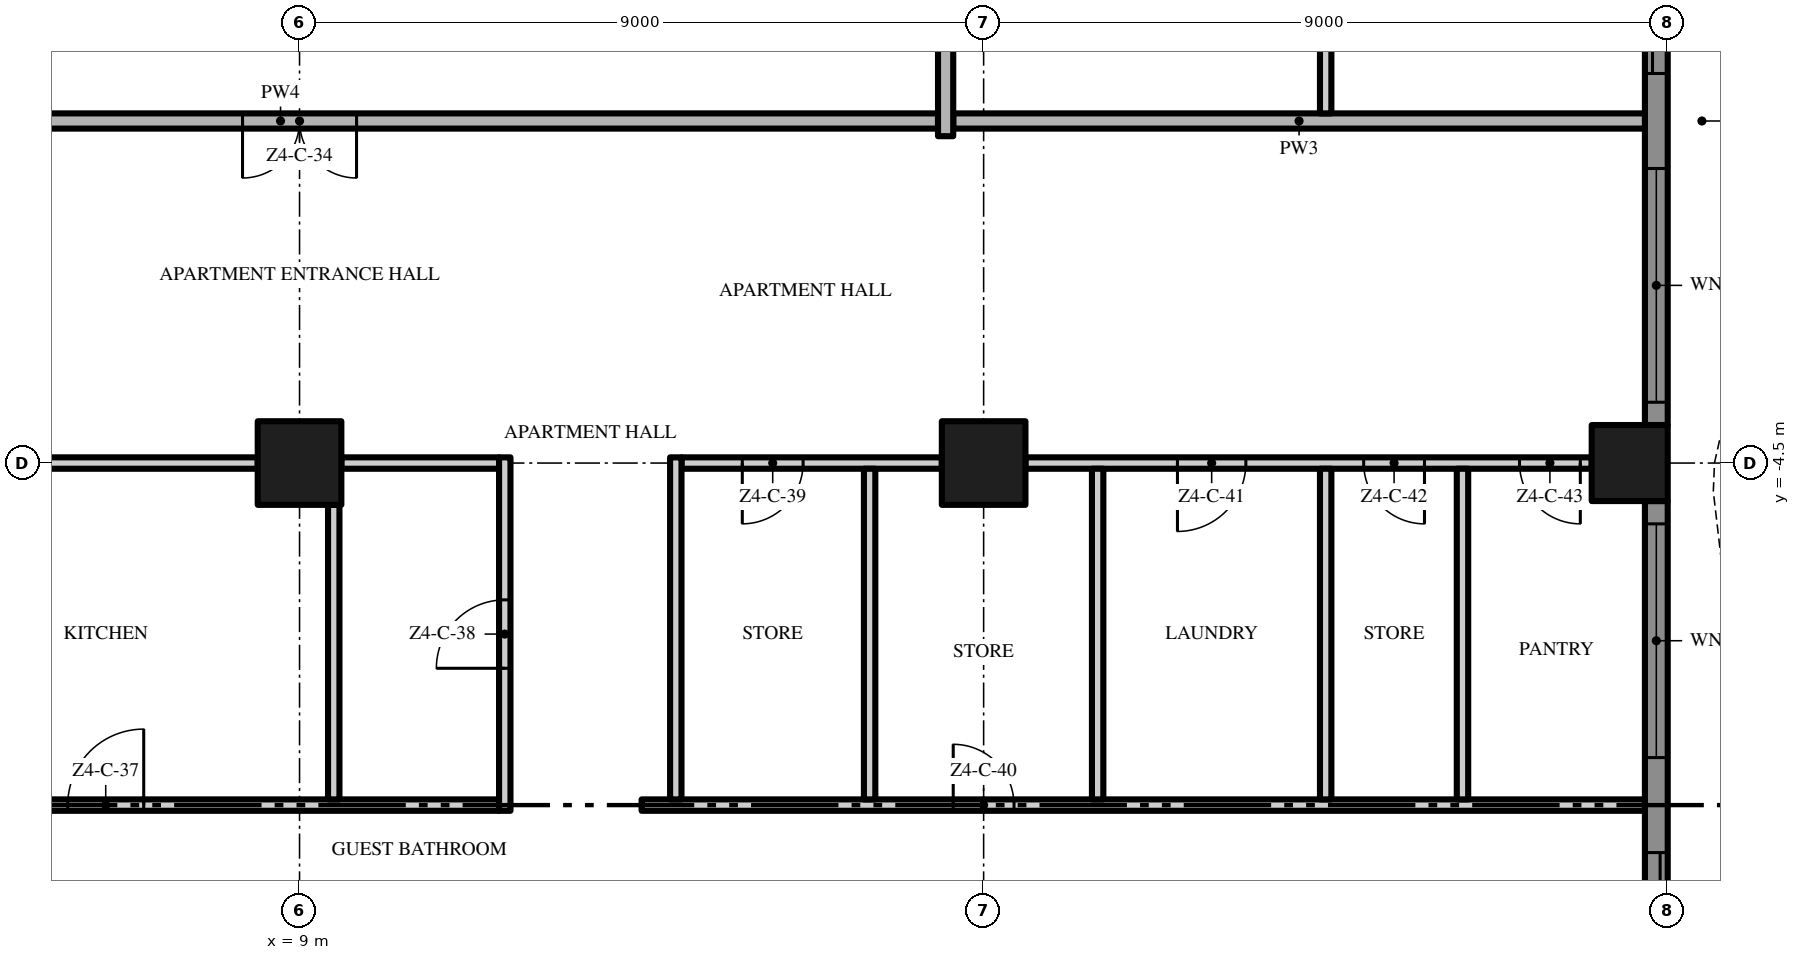
"""IFC4 building model, lengths in metres.
Left out: names, types, materials, properties, quantities, classifications, styles, units other than length and angle.
Written with IfcOpenShell. Run it as: python <this file> out.ifc"""

import sys

from ifc_helpers import new_model, si_unit, direction, frame, frame_2d, origin, origin_2d, place, context, subcontext, project, spatial, polyline, rectangle, outline, extrude, element, fill, save


model = new_model("IFC4")
c1 = context("Model", 3, precision=1e-05, world=origin(), true_north=direction((0.0, 1.0)))
c2 = subcontext(c1, "Body", "Model", "MODEL_VIEW")
j1 = project(units=[si_unit("LENGTHUNIT", "METRE"), si_unit("PLANEANGLEUNIT", "RADIAN")], contexts=[c1])
p1 = place(None, origin())
s1 = spatial("IfcSite", under=j1, at=p1, CompositionType="ELEMENT")
p2 = place(p1, origin())
s2 = spatial("IfcBuilding", under=s1, at=p2, CompositionType="ELEMENT")
p3 = place(p2, frame((0.0, 0.0, 207.2)))
s3 = spatial("IfcBuildingStorey", under=s2, at=p3, CompositionType="ELEMENT", Elevation=207.2)
p4 = place(p3, frame((18.0, -4.5, 0.0), z_axis=(0.0, 0.0, 1.0), x_axis=(1.0, 0.0, 0.0)))
e1 = element("IfcColumn", 1, at=p4, inside=s3, PredefinedType="COLUMN", context=c2, shape_type="SweptSolid", body=[
    extrude(rectangle(XDim=1.1, YDim=1.1, at=origin_2d()), origin(), (0.0, 0.0, 1.0), 3.5),
])
p5 = place(p3, frame((26.5, -4.5, 0.0), z_axis=(0.0, 0.0, 1.0), x_axis=(1.0, 0.0, 0.0)))
e2 = element("IfcColumn", 2, at=p5, inside=s3, PredefinedType="COLUMN", context=c2, shape_type="SweptSolid", body=[
    extrude(rectangle(XDim=1.0, YDim=1.0, at=origin_2d()), origin(), (0.0, 0.0, 1.0), 3.5),
])
p6 = place(p3, frame((9.0, -4.5, 0.0), z_axis=(0.0, 0.0, 1.0), x_axis=(1.0, 0.0, 0.0)))
e3 = element("IfcColumn", 3, at=p6, inside=s3, PredefinedType="COLUMN", context=c2, shape_type="SweptSolid", body=[
    extrude(rectangle(XDim=1.1, YDim=1.1, at=origin_2d()), origin(), (0.0, 0.0, 1.0), 3.5),
])
p7 = place(p3, frame((26.85, -5.0, 0.0), z_axis=(0.0, 0.0, 1.0), x_axis=(0.0, -1.0, 0.0)))
e4 = element("IfcWall", 4, at=p7, inside=s3, PredefinedType="SOLIDWALL", context=c2, shape_type="SweptSolid", body=[
    extrude(rectangle(XDim=8.0, YDim=0.3, at=frame_2d((4.0, 0.0))), origin(), (0.0, 0.0, 1.0), 3.5),
])
p8 = place(p7, frame((4.625, 0.0, 0.0)))
e5 = element("IfcOpeningElement", 5, at=p8, cuts=e4, PredefinedType="OPENING", context=c2, shape_type="SweptSolid", body=[
    extrude(rectangle(XDim=3.075, YDim=2.4, at=frame_2d((1.538, 1.2))), frame((0.0, 0.16, 0.0), z_axis=(0.0, -1.0, 0.0), x_axis=(1.0, 0.0, 0.0)), (0.0, 0.0, 1.0), 0.32),
])
p9 = place(p7, frame((0.3, 0.0, 0.45)))
e6 = element("IfcOpeningElement", 6, at=p9, cuts=e4, PredefinedType="OPENING", context=c2, shape_type="SweptSolid", body=[
    extrude(rectangle(XDim=3.075, YDim=2.65, at=frame_2d((1.538, 1.325))), frame((0.0, 0.16, 0.0), z_axis=(0.0, -1.0, 0.0), x_axis=(1.0, 0.0, 0.0)), (0.0, 0.0, 1.0), 0.32),
])
p10 = place(p3, frame((26.85, 4.0, 0.0), z_axis=(0.0, 0.0, 1.0), x_axis=(0.0, -1.0, 0.0)))
e7 = element("IfcWall", 7, at=p10, inside=s3, PredefinedType="SOLIDWALL", context=c2, shape_type="SweptSolid", body=[
    extrude(rectangle(XDim=8.0, YDim=0.3, at=frame_2d((4.0, 0.0))), origin(), (0.0, 0.0, 1.0), 3.5),
])
p11 = place(p10, frame((4.625, 0.0, 0.45)))
e8 = element("IfcOpeningElement", 8, at=p11, cuts=e7, PredefinedType="OPENING", context=c2, shape_type="SweptSolid", body=[
    extrude(rectangle(XDim=3.075, YDim=2.65, at=frame_2d((1.538, 1.325))), frame((0.0, 0.16, 0.0), z_axis=(0.0, -1.0, 0.0), x_axis=(1.0, 0.0, 0.0)), (0.0, 0.0, 1.0), 0.32),
])
p12 = place(p10, frame((0.3, 0.0, 0.0)))
e9 = element("IfcOpeningElement", 9, at=p12, cuts=e7, PredefinedType="OPENING", context=c2, shape_type="SweptSolid", body=[
    extrude(rectangle(XDim=3.075, YDim=2.4, at=frame_2d((1.538, 1.2))), frame((0.0, 0.16, 0.0), z_axis=(0.0, -1.0, 0.0), x_axis=(1.0, 0.0, 0.0)), (0.0, 0.0, 1.0), 0.32),
])
p13 = place(p3, origin())
e10 = element("IfcWall", 10, at=p13, inside=s3, PredefinedType="USERDEFINED", context=c2, shape_type="SweptSolid", body=[
    extrude(outline(polyline([(27.951, -18.0), (28.612, -16.5), (29.345, -15.0), (29.869, -13.5), (30.0, -12.375), (29.985, -12.0), (29.649, -10.5), (28.988, -9.0), (28.255, -7.5), (27.731, -6.0), (27.6, -4.875), (27.615, -4.5), (27.951, -3.0), (28.612, -1.5), (29.345, 0.0), (29.869, 1.5), (30.0, 2.625), (29.985, 3.0), (29.649, 4.5), (28.988, 6.0), (28.255, 7.5), (27.731, 9.0), (27.6, 10.125), (27.615, 10.5), (27.951, 12.0), (28.612, 13.5), (29.345, 15.0), (29.869, 16.5), (30.0, 17.625), (29.985, 18.0), (29.735, 17.99), (29.749, 17.635), (29.624, 16.556), (29.114, 15.096), (28.385, 13.605), (27.713, 12.079), (27.366, 10.533), (27.349, 10.115), (27.486, 8.944), (28.024, 7.404), (28.761, 5.895), (29.41, 4.421), (29.736, 2.967), (29.749, 2.635), (29.624, 1.556), (29.114, 0.096), (28.385, -1.395), (27.713, -2.921), (27.366, -4.467), (27.349, -4.885), (27.486, -6.056), (28.024, -7.596), (28.761, -9.105), (29.41, -10.579), (29.736, -12.033), (29.749, -12.365), (29.624, -13.444), (29.114, -14.904), (28.385, -16.395), (27.723, -17.899), (27.951, -18.0)])), origin(), (0.0, 0.0, 1.0), 0.9),
])
p14 = place(p3, frame((0.1, -9.0, 0.0), z_axis=(0.0, 0.0, 1.0), x_axis=(1.0, 0.0, 0.0)))
e11 = element("IfcWall", 11, at=p14, inside=s3, PredefinedType="PARTITIONING", context=c2, shape_type="SweptSolid", body=[
    extrude(rectangle(XDim=11.525, YDim=0.15, at=frame_2d((5.763, 0.0))), origin(), (0.0, 0.0, 1.0), 3.5),
])
p15 = place(p14, frame((5.85, 0.0, 0.0)))
e12 = element("IfcOpeningElement", 12, at=p15, cuts=e11, PredefinedType="OPENING", context=c2, shape_type="SweptSolid", body=[
    extrude(rectangle(XDim=1.0, YDim=2.4, at=frame_2d((0.5, 1.2))), frame((0.0, 0.085, 0.0), z_axis=(0.0, -1.0, 0.0), x_axis=(1.0, 0.0, 0.0)), (0.0, 0.0, 1.0), 0.17),
])
p16 = place(p3, frame((13.5, -9.0, 0.0), z_axis=(0.0, 0.0, 1.0), x_axis=(1.0, 0.0, 0.0)))
e13 = element("IfcWall", 13, at=p16, inside=s3, PredefinedType="PARTITIONING", context=c2, shape_type="SweptSolid", body=[
    extrude(rectangle(XDim=13.2, YDim=0.15, at=frame_2d((6.6, 0.0))), origin(), (0.0, 0.0, 1.0), 3.5),
])
p17 = place(p16, frame((4.1, 0.0, 0.0)))
e14 = element("IfcOpeningElement", 14, at=p17, cuts=e13, PredefinedType="OPENING", context=c2, shape_type="SweptSolid", body=[
    extrude(rectangle(XDim=0.8, YDim=2.0, at=frame_2d((0.4, 1.0))), frame((0.0, 0.085, 0.0), z_axis=(0.0, -1.0, 0.0), x_axis=(1.0, 0.0, 0.0)), (0.0, 0.0, 1.0), 0.17),
])
p18 = place(p3, frame((8.45, -4.5, 0.0), z_axis=(0.0, 0.0, 1.0), x_axis=(-1.0, 0.0, 0.0)))
e15 = element("IfcWall", 15, at=p18, inside=s3, PredefinedType="PARTITIONING", context=c2, shape_type="SweptSolid", body=[
    extrude(rectangle(XDim=7.9, YDim=0.15, at=frame_2d((3.95, 0.0))), origin(), (0.0, 0.0, 1.0), 3.5),
])
p19 = place(p18, frame((6.95, 0.0, 0.0)))
e16 = element("IfcOpeningElement", 16, at=p19, cuts=e15, PredefinedType="OPENING", context=c2, shape_type="SweptSolid", body=[
    extrude(rectangle(XDim=0.8, YDim=2.0, at=frame_2d((0.4, 1.0))), frame((0.0, 0.085, 0.0), z_axis=(0.0, -1.0, 0.0), x_axis=(1.0, 0.0, 0.0)), (0.0, 0.0, 1.0), 0.17),
])
p20 = place(p18, frame((5.45, 0.0, 0.0)))
e17 = element("IfcOpeningElement", 17, at=p20, cuts=e15, PredefinedType="OPENING", context=c2, shape_type="SweptSolid", body=[
    extrude(rectangle(XDim=0.8, YDim=2.0, at=frame_2d((0.4, 1.0))), frame((0.0, 0.085, 0.0), z_axis=(0.0, -1.0, 0.0), x_axis=(1.0, 0.0, 0.0)), (0.0, 0.0, 1.0), 0.17),
])
p21 = place(p3, frame((9.55, -4.5, 0.0), z_axis=(0.0, 0.0, 1.0), x_axis=(1.0, 0.0, 0.0)))
e18 = element("IfcWall", 18, at=p21, inside=s3, PredefinedType="PARTITIONING", context=c2, shape_type="SweptSolid", body=[
    extrude(rectangle(XDim=2.075, YDim=0.15, at=frame_2d((1.038, 0.0))), origin(), (0.0, 0.0, 1.0), 3.5),
])
p22 = place(p3, frame((17.45, -4.5, 0.0), z_axis=(0.0, 0.0, 1.0), x_axis=(-1.0, 0.0, 0.0)))
e19 = element("IfcWall", 19, at=p22, inside=s3, PredefinedType="PARTITIONING", context=c2, shape_type="SweptSolid", body=[
    extrude(rectangle(XDim=3.425, YDim=0.15, at=frame_2d((1.712, 0.0))), origin(), (0.0, 0.0, 1.0), 3.5),
])
p23 = place(p22, frame((1.825, 0.0, 0.0)))
e20 = element("IfcOpeningElement", 20, at=p23, cuts=e19, PredefinedType="OPENING", context=c2, shape_type="SweptSolid", body=[
    extrude(rectangle(XDim=0.8, YDim=2.0, at=frame_2d((0.4, 1.0))), frame((0.0, 0.085, 0.0), z_axis=(0.0, -1.0, 0.0), x_axis=(1.0, 0.0, 0.0)), (0.0, 0.0, 1.0), 0.17),
])
p24 = place(p3, frame((26.0, -4.5, 0.0), z_axis=(0.0, 0.0, 1.0), x_axis=(-1.0, 0.0, 0.0)))
e21 = element("IfcWall", 21, at=p24, inside=s3, PredefinedType="PARTITIONING", context=c2, shape_type="SweptSolid", body=[
    extrude(rectangle(XDim=7.45, YDim=0.15, at=frame_2d((3.725, 0.0))), origin(), (0.0, 0.0, 1.0), 3.5),
])
p25 = place(p24, frame((4.55, 0.0, 0.0)))
e22 = element("IfcOpeningElement", 22, at=p25, cuts=e21, PredefinedType="OPENING", context=c2, shape_type="SweptSolid", body=[
    extrude(rectangle(XDim=0.9, YDim=2.1, at=frame_2d((0.45, 1.05))), frame((0.0, 0.085, 0.0), z_axis=(0.0, -1.0, 0.0), x_axis=(1.0, 0.0, 0.0)), (0.0, 0.0, 1.0), 0.17),
])
p26 = place(p24, frame((2.2, 0.0, 0.0)))
e23 = element("IfcOpeningElement", 23, at=p26, cuts=e21, PredefinedType="OPENING", context=c2, shape_type="SweptSolid", body=[
    extrude(rectangle(XDim=0.8, YDim=2.0, at=frame_2d((0.4, 1.0))), frame((0.0, 0.085, 0.0), z_axis=(0.0, -1.0, 0.0), x_axis=(1.0, 0.0, 0.0)), (0.0, 0.0, 1.0), 0.17),
])
p27 = place(p24, frame((0.15, 0.0, 0.0)))
e24 = element("IfcOpeningElement", 24, at=p27, cuts=e21, PredefinedType="OPENING", context=c2, shape_type="SweptSolid", body=[
    extrude(rectangle(XDim=0.8, YDim=2.0, at=frame_2d((0.4, 1.0))), frame((0.0, 0.085, 0.0), z_axis=(0.0, -1.0, 0.0), x_axis=(1.0, 0.0, 0.0)), (0.0, 0.0, 1.0), 0.17),
])
p28 = place(p3, frame((17.4, 0.0, 0.0), z_axis=(0.0, 0.0, 1.0), x_axis=(-1.0, 0.0, 0.0)))
e25 = element("IfcWall", 25, at=p28, inside=s3, PredefinedType="PARTITIONING", context=c2, shape_type="SweptSolid", body=[
    extrude(rectangle(XDim=17.3, YDim=0.2, at=frame_2d((8.65, 0.0))), origin(), (0.0, 0.0, 1.0), 3.5),
])
p29 = place(p28, frame((7.65, 0.0, 0.0)))
e26 = element("IfcOpeningElement", 26, at=p29, cuts=e25, PredefinedType="OPENING", context=c2, shape_type="SweptSolid", body=[
    extrude(rectangle(XDim=1.5, YDim=2.4, at=frame_2d((0.75, 1.2))), frame((0.0, 0.11, 0.0), z_axis=(0.0, -1.0, 0.0), x_axis=(1.0, 0.0, 0.0)), (0.0, 0.0, 1.0), 0.22),
])
p30 = place(p3, frame((17.6, 0.0, 0.0), z_axis=(0.0, 0.0, 1.0), x_axis=(1.0, 0.0, 0.0)))
e27 = element("IfcWall", 27, at=p30, inside=s3, PredefinedType="PARTITIONING", context=c2, shape_type="SweptSolid", body=[
    extrude(rectangle(XDim=9.1, YDim=0.2, at=frame_2d((4.55, 0.0))), origin(), (0.0, 0.0, 1.0), 3.5),
])
p31 = place(p3, frame((9.45, -8.925, 0.0), z_axis=(0.0, 0.0, 1.0), x_axis=(0.0, 1.0, 0.0)))
e28 = element("IfcWall", 28, at=p31, inside=s3, PredefinedType="PARTITIONING", context=c2, shape_type="SweptSolid", body=[
    extrude(rectangle(XDim=3.875, YDim=0.15, at=frame_2d((1.938, 0.0))), origin(), (0.0, 0.0, 1.0), 3.5),
])
p32 = place(p3, frame((11.7, -9.075, 0.0), z_axis=(0.0, 0.0, 1.0), x_axis=(0.0, 1.0, 0.0)))
e29 = element("IfcWall", 29, at=p32, inside=s3, PredefinedType="PARTITIONING", context=c2, shape_type="SweptSolid", body=[
    extrude(rectangle(XDim=4.65, YDim=0.15, at=frame_2d((2.325, 0.0))), origin(), (0.0, 0.0, 1.0), 3.5),
])
p33 = place(p32, frame((1.875, 0.0, 0.0)))
e30 = element("IfcOpeningElement", 30, at=p33, cuts=e29, PredefinedType="OPENING", context=c2, shape_type="SweptSolid", body=[
    extrude(rectangle(XDim=0.9, YDim=2.1, at=frame_2d((0.45, 1.05))), frame((0.0, 0.085, 0.0), z_axis=(0.0, -1.0, 0.0), x_axis=(1.0, 0.0, 0.0)), (0.0, 0.0, 1.0), 0.17),
])
p34 = place(p3, frame((13.95, -8.925, 0.0), z_axis=(0.0, 0.0, 1.0), x_axis=(0.0, 1.0, 0.0)))
e31 = element("IfcWall", 31, at=p34, inside=s3, PredefinedType="PARTITIONING", context=c2, shape_type="SweptSolid", body=[
    extrude(rectangle(XDim=4.5, YDim=0.15, at=frame_2d((2.25, 0.0))), origin(), (0.0, 0.0, 1.0), 3.5),
])
p35 = place(p3, frame((16.5, -8.925, 0.0), z_axis=(0.0, 0.0, 1.0), x_axis=(0.0, 1.0, 0.0)))
e32 = element("IfcWall", 32, at=p35, inside=s3, PredefinedType="PARTITIONING", context=c2, shape_type="SweptSolid", body=[
    extrude(rectangle(XDim=4.35, YDim=0.15, at=frame_2d((2.175, 0.0))), origin(), (0.0, 0.0, 1.0), 3.5),
])
p36 = place(p3, frame((17.5, -0.2, 0.0), z_axis=(0.0, 0.0, 1.0), x_axis=(0.0, 1.0, 0.0)))
e33 = element("IfcWall", 33, at=p36, inside=s3, PredefinedType="PARTITIONING", context=c2, shape_type="SweptSolid", body=[
    extrude(rectangle(XDim=4.15, YDim=0.2, at=frame_2d((2.075, 0.0))), origin(), (0.0, 0.0, 1.0), 3.5),
])
for number, where, z_axis, x_axis in (
    (34, (19.5, -8.925, 0.0), (0.0, 0.0, 1.0), (0.0, 1.0, 0.0)),
    (35, (22.5, -8.925, 0.0), (0.0, 0.0, 1.0), (0.0, 1.0, 0.0)),
):
    element("IfcWall", number, at=place(p3, frame(where, z_axis=z_axis, x_axis=x_axis)), inside=s3, PredefinedType="PARTITIONING", context=c2, shape_type="SweptSolid", body=[
        extrude(rectangle(XDim=4.35, YDim=0.15, at=frame_2d((2.175, 0.0))), origin(), (0.0, 0.0, 1.0), 3.5),
    ])
p37 = place(p3, frame((22.5, 17.5, 0.0), z_axis=(0.0, 0.0, 1.0), x_axis=(0.0, -1.0, 0.0)))
e36 = element("IfcWall", 36, at=p37, inside=s3, PredefinedType="PARTITIONING", context=c2, shape_type="SweptSolid", body=[
    extrude(rectangle(XDim=17.4, YDim=0.15, at=frame_2d((8.7, 0.0))), origin(), (0.0, 0.0, 1.0), 3.5),
])
p38 = place(p37, frame((14.75, 0.0, 0.0)))
e37 = element("IfcOpeningElement", 37, at=p38, cuts=e36, PredefinedType="OPENING", context=c2, shape_type="SweptSolid", body=[
    extrude(rectangle(XDim=1.0, YDim=2.4, at=frame_2d((0.5, 1.2))), frame((0.0, 0.085, 0.0), z_axis=(0.0, -1.0, 0.0), x_axis=(1.0, 0.0, 0.0)), (0.0, 0.0, 1.0), 0.17),
])
p39 = place(p37, frame((11.4, 0.0, 0.0)))
e38 = element("IfcOpeningElement", 38, at=p39, cuts=e36, PredefinedType="OPENING", context=c2, shape_type="SweptSolid", body=[
    extrude(rectangle(XDim=1.0, YDim=2.4, at=frame_2d((0.5, 1.2))), frame((0.0, 0.085, 0.0), z_axis=(0.0, -1.0, 0.0), x_axis=(1.0, 0.0, 0.0)), (0.0, 0.0, 1.0), 0.17),
])
p40 = place(p37, frame((4.25, 0.0, 0.0)))
e39 = element("IfcOpeningElement", 39, at=p40, cuts=e36, PredefinedType="OPENING", context=c2, shape_type="SweptSolid", body=[
    extrude(rectangle(XDim=1.0, YDim=2.4, at=frame_2d((0.5, 1.2))), frame((0.0, 0.085, 0.0), z_axis=(0.0, -1.0, 0.0), x_axis=(1.0, 0.0, 0.0)), (0.0, 0.0, 1.0), 0.17),
])
p41 = place(p3, frame((24.3, -8.925, 0.0), z_axis=(0.0, 0.0, 1.0), x_axis=(0.0, 1.0, 0.0)))
e40 = element("IfcWall", 40, at=p41, inside=s3, PredefinedType="PARTITIONING", context=c2, shape_type="SweptSolid", body=[
    extrude(rectangle(XDim=4.35, YDim=0.15, at=frame_2d((2.175, 0.0))), origin(), (0.0, 0.0, 1.0), 3.5),
])
p42 = place(p8, origin())
e41 = element("IfcDoor", 41, at=p42, inside=s3, OperationType="SINGLE_SWING_LEFT", PredefinedType="DOOR", context=c2, shape_type="SweptSolid", body=[
    extrude(rectangle(XDim=3.075, YDim=2.4, at=frame_2d((1.538, 1.2))), frame((0.0, 0.025, 0.0), z_axis=(0.0, -1.0, 0.0), x_axis=(1.0, 0.0, 0.0)), (0.0, 0.0, 1.0), 0.05),
])
fill(e5, e41)
p43 = place(p9, origin())
e42 = element("IfcWindow", 42, at=p43, inside=s3, PartitioningType="SINGLE_PANEL", PredefinedType="WINDOW", context=c2, shape_type="SweptSolid", body=[
    extrude(rectangle(XDim=3.075, YDim=2.65, at=frame_2d((1.538, 1.325))), frame((0.0, 0.03, 0.0), z_axis=(0.0, -1.0, 0.0), x_axis=(1.0, 0.0, 0.0)), (0.0, 0.0, 1.0), 0.06),
])
fill(e6, e42)
p44 = place(p11, origin())
e43 = element("IfcWindow", 43, at=p44, inside=s3, PartitioningType="SINGLE_PANEL", PredefinedType="WINDOW", context=c2, shape_type="SweptSolid", body=[
    extrude(rectangle(XDim=3.075, YDim=2.65, at=frame_2d((1.538, 1.325))), frame((0.0, 0.03, 0.0), z_axis=(0.0, -1.0, 0.0), x_axis=(1.0, 0.0, 0.0)), (0.0, 0.0, 1.0), 0.06),
])
fill(e8, e43)
p45 = place(p12, origin())
e44 = element("IfcDoor", 44, at=p45, inside=s3, OperationType="SINGLE_SWING_LEFT", PredefinedType="DOOR", context=c2, shape_type="SweptSolid", body=[
    extrude(rectangle(XDim=3.075, YDim=2.4, at=frame_2d((1.538, 1.2))), frame((0.0, 0.025, 0.0), z_axis=(0.0, -1.0, 0.0), x_axis=(1.0, 0.0, 0.0)), (0.0, 0.0, 1.0), 0.05),
])
fill(e9, e44)
p46 = place(p29, origin())
e45 = element("IfcDoor", 45, at=p46, inside=s3, OperationType="DOUBLE_DOOR_SINGLE_SWING", PredefinedType="DOOR", context=c2, shape_type="SweptSolid", body=[
    extrude(rectangle(XDim=1.5, YDim=2.4, at=frame_2d((0.75, 1.2))), frame((0.0, 0.025, 0.0), z_axis=(0.0, -1.0, 0.0), x_axis=(1.0, 0.0, 0.0)), (0.0, 0.0, 1.0), 0.05),
])
fill(e26, e45)
p47 = place(p15, origin())
e46 = element("IfcDoor", 46, at=p47, inside=s3, OperationType="SINGLE_SWING_RIGHT", PredefinedType="DOOR", context=c2, shape_type="SweptSolid", body=[
    extrude(rectangle(XDim=1.0, YDim=2.4, at=frame_2d((0.5, 1.2))), frame((0.0, 0.025, 0.0), z_axis=(0.0, -1.0, 0.0), x_axis=(1.0, 0.0, 0.0)), (0.0, 0.0, 1.0), 0.05),
])
fill(e12, e46)
p48 = place(p33, origin())
e47 = element("IfcDoor", 47, at=p48, inside=s3, OperationType="SINGLE_SWING_LEFT", PredefinedType="DOOR", context=c2, shape_type="SweptSolid", body=[
    extrude(rectangle(XDim=0.9, YDim=2.1, at=frame_2d((0.45, 1.05))), frame((0.0, 0.025, 0.0), z_axis=(0.0, -1.0, 0.0), x_axis=(1.0, 0.0, 0.0)), (0.0, 0.0, 1.0), 0.05),
])
fill(e30, e47)
p49 = place(p23, origin())
e48 = element("IfcDoor", 48, at=p49, inside=s3, OperationType="SINGLE_SWING_RIGHT", PredefinedType="DOOR", context=c2, shape_type="SweptSolid", body=[
    extrude(rectangle(XDim=0.8, YDim=2.0, at=frame_2d((0.4, 1.0))), frame((0.0, 0.025, 0.0), z_axis=(0.0, -1.0, 0.0), x_axis=(1.0, 0.0, 0.0)), (0.0, 0.0, 1.0), 0.05),
])
fill(e20, e48)
p50 = place(p17, origin())
e49 = element("IfcDoor", 49, at=p50, inside=s3, OperationType="SINGLE_SWING_LEFT", PredefinedType="DOOR", context=c2, shape_type="SweptSolid", body=[
    extrude(rectangle(XDim=0.8, YDim=2.0, at=frame_2d((0.4, 1.0))), frame((0.0, 0.025, 0.0), z_axis=(0.0, -1.0, 0.0), x_axis=(1.0, 0.0, 0.0)), (0.0, 0.0, 1.0), 0.05),
])
fill(e14, e49)
p51 = place(p25, origin())
e50 = element("IfcDoor", 50, at=p51, inside=s3, OperationType="SINGLE_SWING_RIGHT", PredefinedType="DOOR", context=c2, shape_type="SweptSolid", body=[
    extrude(rectangle(XDim=0.9, YDim=2.1, at=frame_2d((0.45, 1.05))), frame((0.0, 0.025, 0.0), z_axis=(0.0, -1.0, 0.0), x_axis=(1.0, 0.0, 0.0)), (0.0, 0.0, 1.0), 0.05),
])
fill(e22, e50)
p52 = place(p26, origin())
e51 = element("IfcDoor", 51, at=p52, inside=s3, OperationType="SINGLE_SWING_LEFT", PredefinedType="DOOR", context=c2, shape_type="SweptSolid", body=[
    extrude(rectangle(XDim=0.8, YDim=2.0, at=frame_2d((0.4, 1.0))), frame((0.0, 0.025, 0.0), z_axis=(0.0, -1.0, 0.0), x_axis=(1.0, 0.0, 0.0)), (0.0, 0.0, 1.0), 0.05),
])
fill(e23, e51)
p53 = place(p27, origin())
e52 = element("IfcDoor", 52, at=p53, inside=s3, OperationType="SINGLE_SWING_LEFT", PredefinedType="DOOR", context=c2, shape_type="SweptSolid", body=[
    extrude(rectangle(XDim=0.8, YDim=2.0, at=frame_2d((0.4, 1.0))), frame((0.0, 0.025, 0.0), z_axis=(0.0, -1.0, 0.0), x_axis=(1.0, 0.0, 0.0)), (0.0, 0.0, 1.0), 0.05),
])
fill(e24, e52)
save(model, sys.argv[1])
